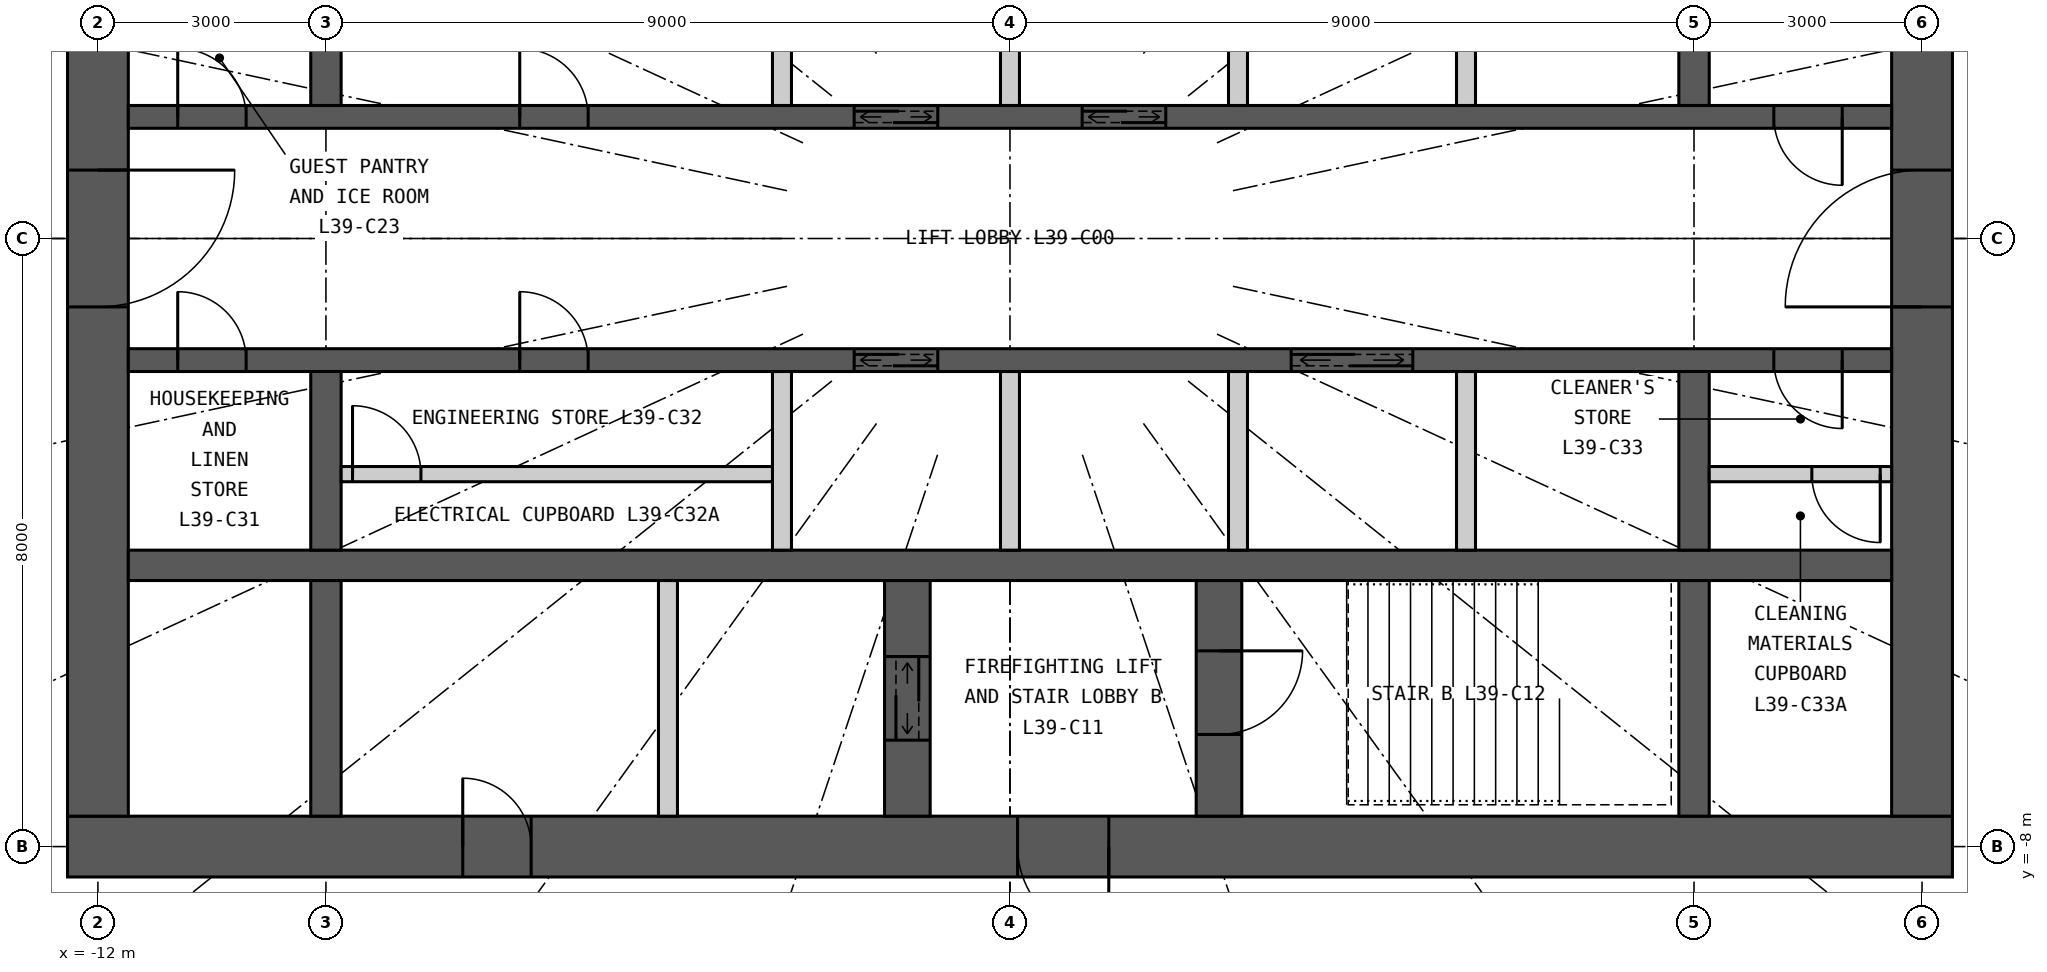
"""IFC4 building model, lengths in metres.
Left out: names, types, materials, properties, quantities, classifications, styles, units other than length and angle.
Written with IfcOpenShell. Run it as: python <this file> out.ifc"""

import sys

from ifc_helpers import new_model, si_unit, direction, frame, frame_2d, origin, place, context, subcontext, project, spatial, rectangle, extrude, element, fill, save


model = new_model("IFC4")
c1 = context("Model", 3, precision=1e-05, world=origin(), true_north=direction((0.0, 1.0)))
c2 = subcontext(c1, "Body", "Model", "MODEL_VIEW")
j1 = project(units=[si_unit("LENGTHUNIT", "METRE"), si_unit("PLANEANGLEUNIT", "RADIAN")], contexts=[c1])
p1 = place(None, origin())
s1 = spatial("IfcSite", under=j1, at=p1, CompositionType="ELEMENT")
p2 = place(p1, origin())
s2 = spatial("IfcBuilding", under=s1, at=p2, CompositionType="ELEMENT")
p3 = place(p2, frame((0.0, 0.0, 150.0)))
s3 = spatial("IfcBuildingStorey", under=s2, at=p3, CompositionType="ELEMENT", Elevation=150.0)
p4 = place(p3, frame((12.4, -8.0, 0.0), z_axis=(0.0, 0.0, 1.0), x_axis=(-1.0, 0.0, 0.0)))
e1 = element("IfcWall", 1, at=p4, inside=s3, PredefinedType="SHEAR", context=c2, shape_type="SweptSolid", body=[
    extrude(rectangle(XDim=24.8, YDim=0.8, at=frame_2d((12.4, 0.0))), origin(), (0.0, 0.0, 1.0), 3.3),
])
p5 = place(p4, frame((11.1, 0.0, 0.0)))
e2 = element("IfcOpeningElement", 2, at=p5, cuts=e1, PredefinedType="OPENING", context=c2, shape_type="SweptSolid", body=[
    extrude(rectangle(XDim=1.2, YDim=2.2, at=frame_2d((0.6, 1.1))), frame((0.0, 0.41, 0.0), z_axis=(0.0, -1.0, 0.0), x_axis=(1.0, 0.0, 0.0)), (0.0, 0.0, 1.0), 0.82),
])
p6 = place(p4, frame((18.7, 0.0, 0.0)))
e3 = element("IfcOpeningElement", 3, at=p6, cuts=e1, PredefinedType="OPENING", context=c2, shape_type="SweptSolid", body=[
    extrude(rectangle(XDim=0.9, YDim=2.2, at=frame_2d((0.45, 1.1))), frame((0.0, 0.41, 0.0), z_axis=(0.0, -1.0, 0.0), x_axis=(1.0, 0.0, 0.0)), (0.0, 0.0, 1.0), 0.82),
])
p7 = place(p3, frame((12.0, -7.6, 0.0), z_axis=(0.0, 0.0, 1.0), x_axis=(0.0, 1.0, 0.0)))
e4 = element("IfcWall", 4, at=p7, inside=s3, PredefinedType="SHEAR", context=c2, shape_type="SweptSolid", body=[
    extrude(rectangle(XDim=15.2, YDim=0.8, at=frame_2d((7.6, 0.0))), origin(), (0.0, 0.0, 1.0), 3.3),
])
p8 = place(p7, frame((6.7, 0.0, 0.0)))
e5 = element("IfcOpeningElement", 5, at=p8, cuts=e4, PredefinedType="OPENING", context=c2, shape_type="SweptSolid", body=[
    extrude(rectangle(XDim=1.8, YDim=2.2, at=frame_2d((0.9, 1.1))), frame((0.0, 0.41, 0.0), z_axis=(0.0, -1.0, 0.0), x_axis=(1.0, 0.0, 0.0)), (0.0, 0.0, 1.0), 0.82),
])
p9 = place(p3, frame((-12.0, 7.6, 0.0), z_axis=(0.0, 0.0, 1.0), x_axis=(0.0, -1.0, 0.0)))
e6 = element("IfcWall", 6, at=p9, inside=s3, PredefinedType="SHEAR", context=c2, shape_type="SweptSolid", body=[
    extrude(rectangle(XDim=15.2, YDim=0.8, at=frame_2d((7.6, 0.0))), origin(), (0.0, 0.0, 1.0), 3.3),
])
p10 = place(p9, frame((6.7, 0.0, 0.0)))
e7 = element("IfcOpeningElement", 7, at=p10, cuts=e6, PredefinedType="OPENING", context=c2, shape_type="SweptSolid", body=[
    extrude(rectangle(XDim=1.8, YDim=2.2, at=frame_2d((0.9, 1.1))), frame((0.0, 0.41, 0.0), z_axis=(0.0, -1.0, 0.0), x_axis=(1.0, 0.0, 0.0)), (0.0, 0.0, 1.0), 0.82),
])
p11 = place(p3, frame((-11.6, 1.6, 0.0), z_axis=(0.0, 0.0, 1.0), x_axis=(1.0, 0.0, 0.0)))
e8 = element("IfcWall", 8, at=p11, inside=s3, PredefinedType="SHEAR", context=c2, shape_type="SweptSolid", body=[
    extrude(rectangle(XDim=23.2, YDim=0.3, at=frame_2d((11.6, 0.0))), origin(), (0.0, 0.0, 1.0), 3.3),
])
p12 = place(p11, frame((9.55, 0.0, 0.0)))
e9 = element("IfcOpeningElement", 9, at=p12, cuts=e8, PredefinedType="OPENING", context=c2, shape_type="SweptSolid", body=[
    extrude(rectangle(XDim=1.1, YDim=2.2, at=frame_2d((0.55, 1.1))), frame((0.0, 0.16, 0.0), z_axis=(0.0, -1.0, 0.0), x_axis=(1.0, 0.0, 0.0)), (0.0, 0.0, 1.0), 0.32),
])
p13 = place(p11, frame((12.55, 0.0, 0.0)))
e10 = element("IfcOpeningElement", 10, at=p13, cuts=e8, PredefinedType="OPENING", context=c2, shape_type="SweptSolid", body=[
    extrude(rectangle(XDim=1.1, YDim=2.2, at=frame_2d((0.55, 1.1))), frame((0.0, 0.16, 0.0), z_axis=(0.0, -1.0, 0.0), x_axis=(1.0, 0.0, 0.0)), (0.0, 0.0, 1.0), 0.32),
])
p14 = place(p11, frame((5.15, 0.0, 0.0)))
e11 = element("IfcOpeningElement", 11, at=p14, cuts=e8, PredefinedType="OPENING", context=c2, shape_type="SweptSolid", body=[
    extrude(rectangle(XDim=0.9, YDim=2.2, at=frame_2d((0.45, 1.1))), frame((0.0, 0.16, 0.0), z_axis=(0.0, -1.0, 0.0), x_axis=(1.0, 0.0, 0.0)), (0.0, 0.0, 1.0), 0.32),
])
p15 = place(p11, frame((21.65, 0.0, 0.0)))
e12 = element("IfcOpeningElement", 12, at=p15, cuts=e8, PredefinedType="OPENING", context=c2, shape_type="SweptSolid", body=[
    extrude(rectangle(XDim=0.9, YDim=2.2, at=frame_2d((0.45, 1.1))), frame((0.0, 0.16, 0.0), z_axis=(0.0, -1.0, 0.0), x_axis=(1.0, 0.0, 0.0)), (0.0, 0.0, 1.0), 0.32),
])
p16 = place(p11, frame((0.65, 0.0, 0.0)))
e13 = element("IfcOpeningElement", 13, at=p16, cuts=e8, PredefinedType="OPENING", context=c2, shape_type="SweptSolid", body=[
    extrude(rectangle(XDim=0.9, YDim=2.2, at=frame_2d((0.45, 1.1))), frame((0.0, 0.16, 0.0), z_axis=(0.0, -1.0, 0.0), x_axis=(1.0, 0.0, 0.0)), (0.0, 0.0, 1.0), 0.32),
])
p17 = place(p3, frame((-11.6, -4.3, 0.0), z_axis=(0.0, 0.0, 1.0), x_axis=(1.0, 0.0, 0.0)))
e14 = element("IfcWall", 14, at=p17, inside=s3, PredefinedType="SHEAR", context=c2, shape_type="SweptSolid", body=[
    extrude(rectangle(XDim=23.2, YDim=0.4, at=frame_2d((11.6, 0.0))), origin(), (0.0, 0.0, 1.0), 3.3),
])
p18 = place(p3, frame((-11.6, -1.6, 0.0), z_axis=(0.0, 0.0, 1.0), x_axis=(1.0, 0.0, 0.0)))
e15 = element("IfcWall", 15, at=p18, inside=s3, PredefinedType="SHEAR", context=c2, shape_type="SweptSolid", body=[
    extrude(rectangle(XDim=23.2, YDim=0.3, at=frame_2d((11.6, 0.0))), origin(), (0.0, 0.0, 1.0), 3.3),
])
p19 = place(p18, frame((9.55, 0.0, 0.0)))
e16 = element("IfcOpeningElement", 16, at=p19, cuts=e15, PredefinedType="OPENING", context=c2, shape_type="SweptSolid", body=[
    extrude(rectangle(XDim=1.1, YDim=2.2, at=frame_2d((0.55, 1.1))), frame((0.0, 0.16, 0.0), z_axis=(0.0, -1.0, 0.0), x_axis=(1.0, 0.0, 0.0)), (0.0, 0.0, 1.0), 0.32),
])
p20 = place(p18, frame((15.3, 0.0, 0.0)))
e17 = element("IfcOpeningElement", 17, at=p20, cuts=e15, PredefinedType="OPENING", context=c2, shape_type="SweptSolid", body=[
    extrude(rectangle(XDim=1.6, YDim=2.4, at=frame_2d((0.8, 1.2))), frame((0.0, 0.16, 0.0), z_axis=(0.0, -1.0, 0.0), x_axis=(1.0, 0.0, 0.0)), (0.0, 0.0, 1.0), 0.32),
])
p21 = place(p18, frame((0.65, 0.0, 0.0)))
e18 = element("IfcOpeningElement", 18, at=p21, cuts=e15, PredefinedType="OPENING", context=c2, shape_type="SweptSolid", body=[
    extrude(rectangle(XDim=0.9, YDim=2.2, at=frame_2d((0.45, 1.1))), frame((0.0, 0.16, 0.0), z_axis=(0.0, -1.0, 0.0), x_axis=(1.0, 0.0, 0.0)), (0.0, 0.0, 1.0), 0.32),
])
p22 = place(p18, frame((5.15, 0.0, 0.0)))
e19 = element("IfcOpeningElement", 19, at=p22, cuts=e15, PredefinedType="OPENING", context=c2, shape_type="SweptSolid", body=[
    extrude(rectangle(XDim=0.9, YDim=2.2, at=frame_2d((0.45, 1.1))), frame((0.0, 0.16, 0.0), z_axis=(0.0, -1.0, 0.0), x_axis=(1.0, 0.0, 0.0)), (0.0, 0.0, 1.0), 0.32),
])
p23 = place(p18, frame((21.65, 0.0, 0.0)))
e20 = element("IfcOpeningElement", 20, at=p23, cuts=e15, PredefinedType="OPENING", context=c2, shape_type="SweptSolid", body=[
    extrude(rectangle(XDim=0.9, YDim=2.2, at=frame_2d((0.45, 1.1))), frame((0.0, 0.16, 0.0), z_axis=(0.0, -1.0, 0.0), x_axis=(1.0, 0.0, 0.0)), (0.0, 0.0, 1.0), 0.32),
])
for number, where, z_axis, x_axis in (
    (21, (-9.0, 1.75, 0.0), (0.0, 0.0, 1.0), (0.0, 1.0, 0.0)),
    (22, (-9.0, -4.1, 0.0), (0.0, 0.0, 1.0), (0.0, 1.0, 0.0)),
):
    element("IfcWall", number, at=place(p3, frame(where, z_axis=z_axis, x_axis=x_axis)), inside=s3, PredefinedType="SHEAR", context=c2, shape_type="SweptSolid", body=[
        extrude(rectangle(XDim=2.35, YDim=0.4, at=frame_2d((1.175, 0.0))), origin(), (0.0, 0.0, 1.0), 3.3),
    ])
p24 = place(p3, frame((-9.0, -7.6, 0.0), z_axis=(0.0, 0.0, 1.0), x_axis=(0.0, 1.0, 0.0)))
e23 = element("IfcWall", 23, at=p24, inside=s3, PredefinedType="SHEAR", context=c2, shape_type="SweptSolid", body=[
    extrude(rectangle(XDim=3.1, YDim=0.4, at=frame_2d((1.55, 0.0))), origin(), (0.0, 0.0, 1.0), 3.3),
])
for number, where, z_axis, x_axis in (
    (24, (9.0, 1.75, 0.0), (0.0, 0.0, 1.0), (0.0, 1.0, 0.0)),
    (25, (9.0, -4.1, 0.0), (0.0, 0.0, 1.0), (0.0, 1.0, 0.0)),
):
    element("IfcWall", number, at=place(p3, frame(where, z_axis=z_axis, x_axis=x_axis)), inside=s3, PredefinedType="SHEAR", context=c2, shape_type="SweptSolid", body=[
        extrude(rectangle(XDim=2.35, YDim=0.4, at=frame_2d((1.175, 0.0))), origin(), (0.0, 0.0, 1.0), 3.3),
    ])
p25 = place(p3, frame((9.0, -7.6, 0.0), z_axis=(0.0, 0.0, 1.0), x_axis=(0.0, 1.0, 0.0)))
e26 = element("IfcWall", 26, at=p25, inside=s3, PredefinedType="SHEAR", context=c2, shape_type="SweptSolid", body=[
    extrude(rectangle(XDim=3.1, YDim=0.4, at=frame_2d((1.55, 0.0))), origin(), (0.0, 0.0, 1.0), 3.3),
])
p26 = place(p3, frame((2.75, -7.6, 0.0), z_axis=(0.0, 0.0, 1.0), x_axis=(0.0, 1.0, 0.0)))
e27 = element("IfcWall", 27, at=p26, inside=s3, PredefinedType="SHEAR", context=c2, shape_type="SweptSolid", body=[
    extrude(rectangle(XDim=3.1, YDim=0.6, at=frame_2d((1.55, 0.0))), origin(), (0.0, 0.0, 1.0), 3.3),
])
p27 = place(p26, frame((1.075, 0.0, 0.0)))
e28 = element("IfcOpeningElement", 28, at=p27, cuts=e27, PredefinedType="OPENING", context=c2, shape_type="SweptSolid", body=[
    extrude(rectangle(XDim=1.1, YDim=2.2, at=frame_2d((0.55, 1.1))), frame((0.0, 0.31, 0.0), z_axis=(0.0, -1.0, 0.0), x_axis=(1.0, 0.0, 0.0)), (0.0, 0.0, 1.0), 0.62),
])
p28 = place(p3, frame((-1.35, -7.6, 0.0), z_axis=(0.0, 0.0, 1.0), x_axis=(0.0, 1.0, 0.0)))
e29 = element("IfcWall", 29, at=p28, inside=s3, PredefinedType="SHEAR", context=c2, shape_type="SweptSolid", body=[
    extrude(rectangle(XDim=3.1, YDim=0.6, at=frame_2d((1.55, 0.0))), origin(), (0.0, 0.0, 1.0), 3.3),
])
p29 = place(p28, frame((1.0, 0.0, 0.0)))
e30 = element("IfcOpeningElement", 30, at=p29, cuts=e29, PredefinedType="OPENING", context=c2, shape_type="SweptSolid", body=[
    extrude(rectangle(XDim=1.1, YDim=2.2, at=frame_2d((0.55, 1.1))), frame((0.0, 0.31, 0.0), z_axis=(0.0, -1.0, 0.0), x_axis=(1.0, 0.0, 0.0)), (0.0, 0.0, 1.0), 0.62),
])
p30 = place(p3, frame((-4.5, -7.6, 0.0), z_axis=(0.0, 0.0, 1.0), x_axis=(0.0, 1.0, 0.0)))
e31 = element("IfcWall", 31, at=p30, inside=s3, PredefinedType="PARTITIONING", context=c2, shape_type="SweptSolid", body=[
    extrude(rectangle(XDim=3.1, YDim=0.25, at=frame_2d((1.55, 0.0))), origin(), (0.0, 0.0, 1.0), 3.3),
])
for number, where, z_axis, x_axis in (
    (32, (-3.0, 1.75, 0.0), (0.0, 0.0, 1.0), (0.0, 1.0, 0.0)),
    (33, (0.0, 1.75, 0.0), (0.0, 0.0, 1.0), (0.0, 1.0, 0.0)),
    (34, (3.0, 1.75, 0.0), (0.0, 0.0, 1.0), (0.0, 1.0, 0.0)),
    (35, (6.0, 1.75, 0.0), (0.0, 0.0, 1.0), (0.0, 1.0, 0.0)),
    (36, (-3.0, -4.1, 0.0), (0.0, 0.0, 1.0), (0.0, 1.0, 0.0)),
    (37, (0.0, -4.1, 0.0), (0.0, 0.0, 1.0), (0.0, 1.0, 0.0)),
    (38, (3.0, -4.1, 0.0), (0.0, 0.0, 1.0), (0.0, 1.0, 0.0)),
    (39, (6.0, -4.1, 0.0), (0.0, 0.0, 1.0), (0.0, 1.0, 0.0)),
):
    element("IfcWall", number, at=place(p3, frame(where, z_axis=z_axis, x_axis=x_axis)), inside=s3, PredefinedType="PARTITIONING", context=c2, shape_type="SweptSolid", body=[
        extrude(rectangle(XDim=2.35, YDim=0.25, at=frame_2d((1.175, 0.0))), origin(), (0.0, 0.0, 1.0), 3.3),
    ])
p31 = place(p3, frame((-8.8, -3.1, 0.0), z_axis=(0.0, 0.0, 1.0), x_axis=(1.0, 0.0, 0.0)))
e40 = element("IfcWall", 40, at=p31, inside=s3, PredefinedType="PARTITIONING", context=c2, shape_type="SweptSolid", body=[
    extrude(rectangle(XDim=5.675, YDim=0.2, at=frame_2d((2.837, 0.0))), origin(), (0.0, 0.0, 1.0), 3.12),
])
p32 = place(p31, frame((0.15, 0.0, 0.0)))
e41 = element("IfcOpeningElement", 41, at=p32, cuts=e40, PredefinedType="OPENING", context=c2, shape_type="SweptSolid", body=[
    extrude(rectangle(XDim=0.9, YDim=2.2, at=frame_2d((0.45, 1.1))), frame((0.0, 0.11, 0.0), z_axis=(0.0, -1.0, 0.0), x_axis=(1.0, 0.0, 0.0)), (0.0, 0.0, 1.0), 0.22),
])
p33 = place(p3, frame((9.2, -3.1, 0.0), z_axis=(0.0, 0.0, 1.0), x_axis=(1.0, 0.0, 0.0)))
e42 = element("IfcWall", 42, at=p33, inside=s3, PredefinedType="PARTITIONING", context=c2, shape_type="SweptSolid", body=[
    extrude(rectangle(XDim=2.4, YDim=0.2, at=frame_2d((1.2, 0.0))), origin(), (0.0, 0.0, 1.0), 3.12),
])
p34 = place(p33, frame((1.35, 0.0, 0.0)))
e43 = element("IfcOpeningElement", 43, at=p34, cuts=e42, PredefinedType="OPENING", context=c2, shape_type="SweptSolid", body=[
    extrude(rectangle(XDim=0.9, YDim=2.2, at=frame_2d((0.45, 1.1))), frame((0.0, 0.11, 0.0), z_axis=(0.0, -1.0, 0.0), x_axis=(1.0, 0.0, 0.0)), (0.0, 0.0, 1.0), 0.22),
])
p35 = place(p5, origin())
e44 = element("IfcDoor", 44, at=p35, inside=s3, OperationType="SINGLE_SWING_LEFT", PredefinedType="DOOR", context=c2, shape_type="SweptSolid", body=[
    extrude(rectangle(XDim=1.2, YDim=2.2, at=frame_2d((0.6, 1.1))), frame((0.0, 0.025, 0.0), z_axis=(0.0, -1.0, 0.0), x_axis=(1.0, 0.0, 0.0)), (0.0, 0.0, 1.0), 0.05),
])
fill(e2, e44)
p36 = place(p27, origin())
e45 = element("IfcDoor", 45, at=p36, inside=s3, OperationType="SINGLE_SWING_RIGHT", PredefinedType="DOOR", context=c2, shape_type="SweptSolid", body=[
    extrude(rectangle(XDim=1.1, YDim=2.2, at=frame_2d((0.55, 1.1))), frame((0.0, 0.025, 0.0), z_axis=(0.0, -1.0, 0.0), x_axis=(1.0, 0.0, 0.0)), (0.0, 0.0, 1.0), 0.05),
])
fill(e28, e45)
p37 = place(p29, origin())
e46 = element("IfcDoor", 46, at=p37, inside=s3, OperationType="DOUBLE_DOOR_SLIDING", PredefinedType="DOOR", context=c2, shape_type="SweptSolid", body=[
    extrude(rectangle(XDim=1.1, YDim=2.2, at=frame_2d((0.55, 1.1))), frame((0.0, 0.025, 0.0), z_axis=(0.0, -1.0, 0.0), x_axis=(1.0, 0.0, 0.0)), (0.0, 0.0, 1.0), 0.05),
])
fill(e30, e46)
p38 = place(p6, origin())
e47 = element("IfcDoor", 47, at=p38, inside=s3, OperationType="SINGLE_SWING_RIGHT", PredefinedType="DOOR", context=c2, shape_type="SweptSolid", body=[
    extrude(rectangle(XDim=0.9, YDim=2.2, at=frame_2d((0.45, 1.1))), frame((0.0, 0.025, 0.0), z_axis=(0.0, -1.0, 0.0), x_axis=(1.0, 0.0, 0.0)), (0.0, 0.0, 1.0), 0.05),
])
fill(e3, e47)
p39 = place(p12, origin())
e48 = element("IfcDoor", 48, at=p39, inside=s3, OperationType="DOUBLE_DOOR_SLIDING", PredefinedType="DOOR", context=c2, shape_type="SweptSolid", body=[
    extrude(rectangle(XDim=1.1, YDim=2.2, at=frame_2d((0.55, 1.1))), frame((0.0, 0.025, 0.0), z_axis=(0.0, -1.0, 0.0), x_axis=(1.0, 0.0, 0.0)), (0.0, 0.0, 1.0), 0.05),
])
fill(e9, e48)
p40 = place(p13, origin())
e49 = element("IfcDoor", 49, at=p40, inside=s3, OperationType="DOUBLE_DOOR_SLIDING", PredefinedType="DOOR", context=c2, shape_type="SweptSolid", body=[
    extrude(rectangle(XDim=1.1, YDim=2.2, at=frame_2d((0.55, 1.1))), frame((0.0, 0.025, 0.0), z_axis=(0.0, -1.0, 0.0), x_axis=(1.0, 0.0, 0.0)), (0.0, 0.0, 1.0), 0.05),
])
fill(e10, e49)
p41 = place(p19, origin())
e50 = element("IfcDoor", 50, at=p41, inside=s3, OperationType="DOUBLE_DOOR_SLIDING", PredefinedType="DOOR", context=c2, shape_type="SweptSolid", body=[
    extrude(rectangle(XDim=1.1, YDim=2.2, at=frame_2d((0.55, 1.1))), frame((0.0, 0.025, 0.0), z_axis=(0.0, -1.0, 0.0), x_axis=(1.0, 0.0, 0.0)), (0.0, 0.0, 1.0), 0.05),
])
fill(e16, e50)
p42 = place(p20, origin())
e51 = element("IfcDoor", 51, at=p42, inside=s3, OperationType="DOUBLE_DOOR_SLIDING", PredefinedType="DOOR", context=c2, shape_type="SweptSolid", body=[
    extrude(rectangle(XDim=1.6, YDim=2.4, at=frame_2d((0.8, 1.2))), frame((0.0, 0.025, 0.0), z_axis=(0.0, -1.0, 0.0), x_axis=(1.0, 0.0, 0.0)), (0.0, 0.0, 1.0), 0.05),
])
fill(e17, e51)
p43 = place(p14, origin())
e52 = element("IfcDoor", 52, at=p43, inside=s3, OperationType="SINGLE_SWING_LEFT", PredefinedType="DOOR", context=c2, shape_type="SweptSolid", body=[
    extrude(rectangle(XDim=0.9, YDim=2.2, at=frame_2d((0.45, 1.1))), frame((0.0, 0.025, 0.0), z_axis=(0.0, -1.0, 0.0), x_axis=(1.0, 0.0, 0.0)), (0.0, 0.0, 1.0), 0.05),
])
fill(e11, e52)
p44 = place(p15, origin())
e53 = element("IfcDoor", 53, at=p44, inside=s3, OperationType="SINGLE_SWING_RIGHT", PredefinedType="DOOR", context=c2, shape_type="SweptSolid", body=[
    extrude(rectangle(XDim=0.9, YDim=2.2, at=frame_2d((0.45, 1.1))), frame((0.0, 0.025, 0.0), z_axis=(0.0, -1.0, 0.0), x_axis=(1.0, 0.0, 0.0)), (0.0, 0.0, 1.0), 0.05),
])
fill(e12, e53)
p45 = place(p21, origin())
e54 = element("IfcDoor", 54, at=p45, inside=s3, OperationType="SINGLE_SWING_LEFT", PredefinedType="DOOR", context=c2, shape_type="SweptSolid", body=[
    extrude(rectangle(XDim=0.9, YDim=2.2, at=frame_2d((0.45, 1.1))), frame((0.0, 0.025, 0.0), z_axis=(0.0, -1.0, 0.0), x_axis=(1.0, 0.0, 0.0)), (0.0, 0.0, 1.0), 0.05),
])
fill(e18, e54)
p46 = place(p32, origin())
e55 = element("IfcDoor", 55, at=p46, inside=s3, OperationType="SINGLE_SWING_LEFT", PredefinedType="DOOR", context=c2, shape_type="SweptSolid", body=[
    extrude(rectangle(XDim=0.9, YDim=2.2, at=frame_2d((0.45, 1.1))), frame((0.0, 0.025, 0.0), z_axis=(0.0, -1.0, 0.0), x_axis=(1.0, 0.0, 0.0)), (0.0, 0.0, 1.0), 0.05),
])
fill(e41, e55)
p47 = place(p22, origin())
e56 = element("IfcDoor", 56, at=p47, inside=s3, OperationType="SINGLE_SWING_LEFT", PredefinedType="DOOR", context=c2, shape_type="SweptSolid", body=[
    extrude(rectangle(XDim=0.9, YDim=2.2, at=frame_2d((0.45, 1.1))), frame((0.0, 0.025, 0.0), z_axis=(0.0, -1.0, 0.0), x_axis=(1.0, 0.0, 0.0)), (0.0, 0.0, 1.0), 0.05),
])
fill(e19, e56)
p48 = place(p34, origin())
e57 = element("IfcDoor", 57, at=p48, inside=s3, OperationType="SINGLE_SWING_RIGHT", PredefinedType="DOOR", context=c2, shape_type="SweptSolid", body=[
    extrude(rectangle(XDim=0.9, YDim=2.2, at=frame_2d((0.45, 1.1))), frame((0.0, 0.025, 0.0), z_axis=(0.0, -1.0, 0.0), x_axis=(1.0, 0.0, 0.0)), (0.0, 0.0, 1.0), 0.05),
])
fill(e43, e57)
p49 = place(p23, origin())
e58 = element("IfcDoor", 58, at=p49, inside=s3, OperationType="SINGLE_SWING_RIGHT", PredefinedType="DOOR", context=c2, shape_type="SweptSolid", body=[
    extrude(rectangle(XDim=0.9, YDim=2.2, at=frame_2d((0.45, 1.1))), frame((0.0, 0.025, 0.0), z_axis=(0.0, -1.0, 0.0), x_axis=(1.0, 0.0, 0.0)), (0.0, 0.0, 1.0), 0.05),
])
fill(e20, e58)
p50 = place(p16, origin())
e59 = element("IfcDoor", 59, at=p50, inside=s3, OperationType="SINGLE_SWING_LEFT", PredefinedType="DOOR", context=c2, shape_type="SweptSolid", body=[
    extrude(rectangle(XDim=0.9, YDim=2.2, at=frame_2d((0.45, 1.1))), frame((0.0, 0.025, 0.0), z_axis=(0.0, -1.0, 0.0), x_axis=(1.0, 0.0, 0.0)), (0.0, 0.0, 1.0), 0.05),
])
fill(e13, e59)
p51 = place(p8, origin())
e60 = element("IfcDoor", 60, at=p51, inside=s3, OperationType="DOUBLE_DOOR_DOUBLE_SWING", PredefinedType="DOOR", context=c2, shape_type="SweptSolid", body=[
    extrude(rectangle(XDim=1.8, YDim=2.2, at=frame_2d((0.9, 1.1))), frame((0.0, 0.025, 0.0), z_axis=(0.0, -1.0, 0.0), x_axis=(1.0, 0.0, 0.0)), (0.0, 0.0, 1.0), 0.05),
])
fill(e5, e60)
p52 = place(p10, origin())
e61 = element("IfcDoor", 61, at=p52, inside=s3, OperationType="DOUBLE_DOOR_DOUBLE_SWING", PredefinedType="DOOR", context=c2, shape_type="SweptSolid", body=[
    extrude(rectangle(XDim=1.8, YDim=2.2, at=frame_2d((0.9, 1.1))), frame((0.0, 0.025, 0.0), z_axis=(0.0, -1.0, 0.0), x_axis=(1.0, 0.0, 0.0)), (0.0, 0.0, 1.0), 0.05),
])
fill(e7, e61)
save(model, sys.argv[1])
